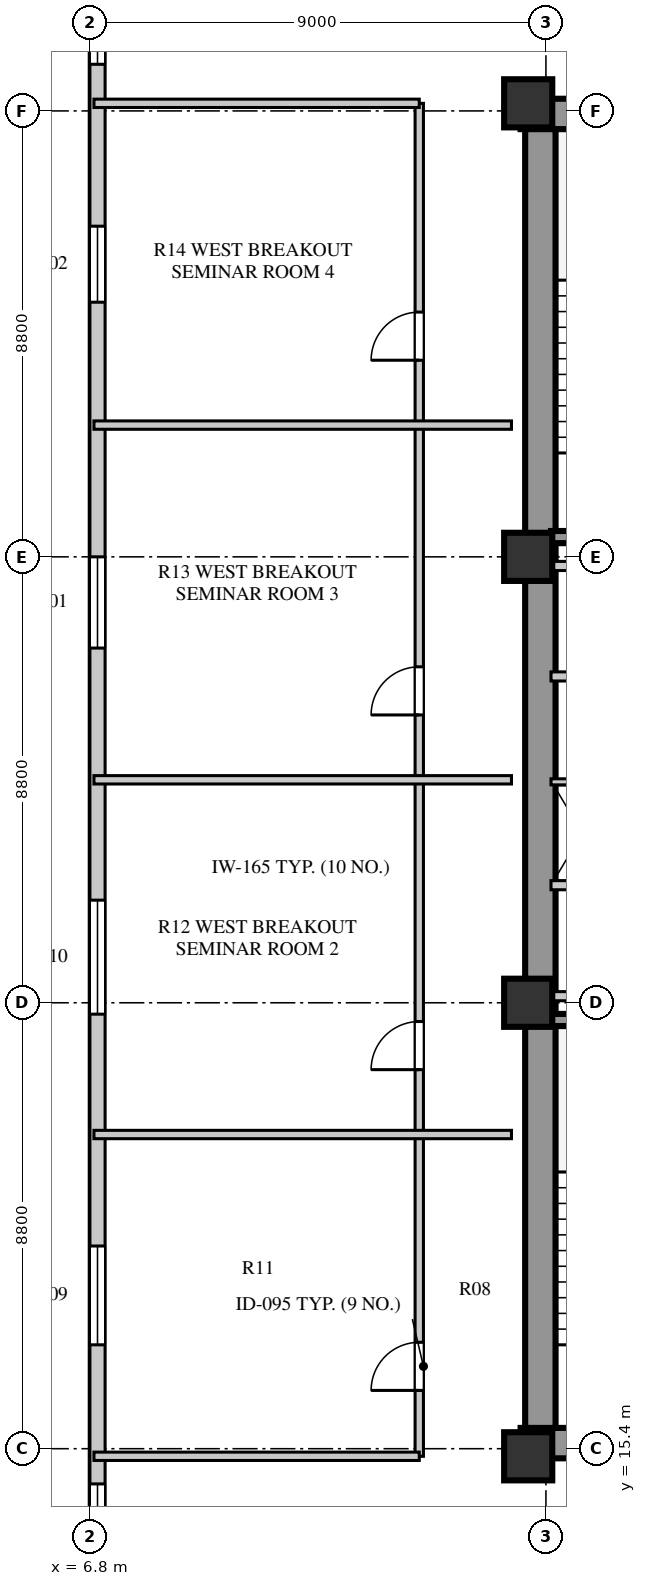
"""IFC4 building model, lengths in metres.
Left out: names, types, materials, properties, quantities, classifications, styles, units other than length and angle.
Written with IfcOpenShell. Run it as: python <this file> out.ifc"""

import sys

from ifc_helpers import new_model, si_unit, direction, frame, frame_2d, origin, origin_2d, place, context, subcontext, project, spatial, rectangle, extrude, element, fill, save


model = new_model("IFC4")
c1 = context("Model", 3, precision=1e-05, world=origin(), true_north=direction((0.0, 1.0)))
c2 = subcontext(c1, "Body", "Model", "MODEL_VIEW")
j1 = project(units=[si_unit("LENGTHUNIT", "METRE"), si_unit("PLANEANGLEUNIT", "RADIAN")], contexts=[c1])
p1 = place(None, origin())
s1 = spatial("IfcSite", under=j1, at=p1, CompositionType="ELEMENT")
p2 = place(p1, origin())
s2 = spatial("IfcBuilding", under=s1, at=p2, CompositionType="ELEMENT")
p3 = place(p2, frame((0.0, 0.0, 21.5)))
s3 = spatial("IfcBuildingStorey", under=s2, at=p3, CompositionType="ELEMENT", Elevation=21.5)
for number, where, z_axis, x_axis in (
    (1, (15.3, 15.51, 0.0), (0.0, 0.0, 1.0), (1.0, 0.0, 0.0)),
    (2, (15.3, 41.74, 0.0), (0.0, 0.0, 1.0), (1.0, 0.0, 0.0)),
):
    element("IfcWall", number, at=place(p3, frame(where, z_axis=z_axis, x_axis=x_axis)), inside=s3, PredefinedType="SHEAR", context=c2, shape_type="SweptSolid", body=[
        extrude(rectangle(XDim=9.88, YDim=0.6, at=frame_2d((4.94, 0.0))), origin(), (0.0, 0.0, 1.0), 4.22),
    ])
p4 = place(p3, frame((15.69, 15.81, 0.0), z_axis=(0.0, 0.0, 1.0), x_axis=(0.0, 1.0, 0.0)))
e3 = element("IfcWall", 3, at=p4, inside=s3, PredefinedType="SHEAR", context=c2, shape_type="SweptSolid", body=[
    extrude(rectangle(XDim=25.63, YDim=0.6, at=frame_2d((12.815, 0.0))), origin(), (0.0, 0.0, 1.0), 4.22),
])
for number, where, z_axis, x_axis in (
    (4, (15.45, 15.25, 0.0), (0.0, 0.0, 1.0), (1.0, 0.0, 0.0)),
    (5, (15.45, 24.2, 0.0), (0.0, 0.0, 1.0), (1.0, 0.0, 0.0)),
    (6, (15.45, 33.0, 0.0), (0.0, 0.0, 1.0), (1.0, 0.0, 0.0)),
    (7, (15.45, 41.95, 0.0), (0.0, 0.0, 1.0), (1.0, 0.0, 0.0)),
):
    element("IfcColumn", number, at=place(p3, frame(where, z_axis=z_axis, x_axis=x_axis)), inside=s3, PredefinedType="COLUMN", context=c2, shape_type="SweptSolid", body=[
        extrude(rectangle(XDim=0.95, YDim=0.95, at=origin_2d()), origin(), (0.0, 0.0, 1.0), 4.22),
    ])
p5 = place(p3, frame((6.95, 44.8, 0.0), z_axis=(0.0, 0.0, 1.0), x_axis=(0.0, -1.0, 0.0)))
e8 = element("IfcWall", 8, at=p5, inside=s3, PredefinedType="STANDARD", context=c2, shape_type="SweptSolid", body=[
    extrude(rectangle(XDim=32.4, YDim=0.3, at=frame_2d((16.2, 0.0))), origin(), (0.0, 0.0, 1.0), 4.22),
])
p6 = place(p5, frame((30.095, 0.0, 0.8)))
e9 = element("IfcOpeningElement", 9, at=p6, cuts=e8, PredefinedType="OPENING", context=c2, shape_type="SweptSolid", body=[
    extrude(rectangle(XDim=1.65, YDim=1.95, at=frame_2d((0.825, 0.975))), frame((0.0, 0.16, 0.0), z_axis=(0.0, -1.0, 0.0), x_axis=(1.0, 0.0, 0.0)), (0.0, 0.0, 1.0), 0.32),
])
p7 = place(p5, frame((25.4, 0.0, 0.8)))
e10 = element("IfcOpeningElement", 10, at=p7, cuts=e8, PredefinedType="OPENING", context=c2, shape_type="SweptSolid", body=[
    extrude(rectangle(XDim=1.95, YDim=2.0, at=frame_2d((0.975, 1.0))), frame((0.0, 0.16, 0.0), z_axis=(0.0, -1.0, 0.0), x_axis=(1.0, 0.0, 0.0)), (0.0, 0.0, 1.0), 0.32),
])
p8 = place(p5, frame((18.575, 0.0, 0.8)))
e11 = element("IfcOpeningElement", 11, at=p8, cuts=e8, PredefinedType="OPENING", context=c2, shape_type="SweptSolid", body=[
    extrude(rectangle(XDim=2.25, YDim=2.0, at=frame_2d((1.125, 1.0))), frame((0.0, 0.16, 0.0), z_axis=(0.0, -1.0, 0.0), x_axis=(1.0, 0.0, 0.0)), (0.0, 0.0, 1.0), 0.32),
])
p9 = place(p5, frame((11.8, 0.0, 0.8)))
e12 = element("IfcOpeningElement", 12, at=p9, cuts=e8, PredefinedType="OPENING", context=c2, shape_type="SweptSolid", body=[
    extrude(rectangle(XDim=1.8, YDim=2.0, at=frame_2d((0.9, 1.0))), frame((0.0, 0.16, 0.0), z_axis=(0.0, -1.0, 0.0), x_axis=(1.0, 0.0, 0.0)), (0.0, 0.0, 1.0), 0.32),
])
p10 = place(p5, frame((5.275, 0.0, 0.8)))
e13 = element("IfcOpeningElement", 13, at=p10, cuts=e8, PredefinedType="OPENING", context=c2, shape_type="SweptSolid", body=[
    extrude(rectangle(XDim=1.5, YDim=2.0, at=frame_2d((0.75, 1.0))), frame((0.0, 0.16, 0.0), z_axis=(0.0, -1.0, 0.0), x_axis=(1.0, 0.0, 0.0)), (0.0, 0.0, 1.0), 0.32),
])
p11 = place(p5, frame((0.88, 0.0, 0.8)))
e14 = element("IfcOpeningElement", 14, at=p11, cuts=e8, PredefinedType="OPENING", context=c2, shape_type="SweptSolid", body=[
    extrude(rectangle(XDim=1.2, YDim=1.75, at=frame_2d((0.6, 0.875))), frame((0.0, 0.16, 0.0), z_axis=(0.0, -1.0, 0.0), x_axis=(1.0, 0.0, 0.0)), (0.0, 0.0, 1.0), 0.32),
])
p12 = place(p3, frame((15.9, 23.86, 0.0), z_axis=(0.0, 0.0, 1.0), x_axis=(1.0, 0.0, 0.0)))
e15 = element("IfcWall", 15, at=p12, inside=s3, PredefinedType="SHEAR", context=c2, shape_type="SweptSolid", body=[
    extrude(rectangle(XDim=3.52, YDim=0.24, at=frame_2d((1.76, 0.0))), origin(), (0.0, 0.0, 1.0), 4.5),
])
p13 = place(p3, frame((15.9, 26.52, 0.0), z_axis=(0.0, 0.0, 1.0), x_axis=(1.0, 0.0, 0.0)))
e16 = element("IfcWall", 16, at=p13, inside=s3, PredefinedType="SOLIDWALL", context=c2, shape_type="SweptSolid", body=[
    extrude(rectangle(XDim=8.68, YDim=0.18, at=frame_2d((4.34, 0.0))), origin(), (0.0, 0.0, 1.0), 4.22),
])
p14 = place(p13, frame((1.76, 0.0, 0.0)))
e17 = element("IfcOpeningElement", 17, at=p14, cuts=e16, PredefinedType="OPENING", context=c2, shape_type="SweptSolid", body=[
    extrude(rectangle(XDim=1.0, YDim=2.1, at=frame_2d((0.5, 1.05))), frame((0.0, 0.1, 0.0), z_axis=(0.0, -1.0, 0.0), x_axis=(1.0, 0.0, 0.0)), (0.0, 0.0, 1.0), 0.2),
])
p15 = place(p13, frame((3.6, 0.0, 0.0)))
e18 = element("IfcOpeningElement", 18, at=p15, cuts=e16, PredefinedType="OPENING", context=c2, shape_type="SweptSolid", body=[
    extrude(rectangle(XDim=1.0, YDim=2.1, at=frame_2d((0.5, 1.05))), frame((0.0, 0.1, 0.0), z_axis=(0.0, -1.0, 0.0), x_axis=(1.0, 0.0, 0.0)), (0.0, 0.0, 1.0), 0.2),
])
p16 = place(p13, frame((5.44, 0.0, 0.0)))
e19 = element("IfcOpeningElement", 19, at=p16, cuts=e16, PredefinedType="OPENING", context=c2, shape_type="SweptSolid", body=[
    extrude(rectangle(XDim=1.0, YDim=2.1, at=frame_2d((0.5, 1.05))), frame((0.0, 0.1, 0.0), z_axis=(0.0, -1.0, 0.0), x_axis=(1.0, 0.0, 0.0)), (0.0, 0.0, 1.0), 0.2),
])
p17 = place(p13, frame((7.28, 0.0, 0.0)))
e20 = element("IfcOpeningElement", 20, at=p17, cuts=e16, PredefinedType="OPENING", context=c2, shape_type="SweptSolid", body=[
    extrude(rectangle(XDim=1.0, YDim=2.1, at=frame_2d((0.5, 1.05))), frame((0.0, 0.1, 0.0), z_axis=(0.0, -1.0, 0.0), x_axis=(1.0, 0.0, 0.0)), (0.0, 0.0, 1.0), 0.2),
])
p18 = place(p3, frame((15.9, 24.33, 0.0), z_axis=(0.0, 0.0, 1.0), x_axis=(1.0, 0.0, 0.0)))
e21 = element("IfcWall", 21, at=p18, inside=s3, PredefinedType="SOLIDWALL", context=c2, shape_type="SweptSolid", body=[
    extrude(rectangle(XDim=8.68, YDim=0.18, at=frame_2d((4.34, 0.0))), origin(), (0.0, 0.0, 1.0), 3.42),
])
p19 = place(p3, frame((15.9, 28.56, 0.0), z_axis=(0.0, 0.0, 1.0), x_axis=(1.0, 0.0, 0.0)))
e22 = element("IfcWall", 22, at=p19, inside=s3, PredefinedType="PARTITIONING", context=c2, shape_type="SweptSolid", body=[
    extrude(rectangle(XDim=1.2, YDim=0.12, at=frame_2d((0.6, 0.0))), origin(), (0.0, 0.0, 1.0), 4.22),
])
p20 = place(p3, frame((15.9, 30.64, 0.0), z_axis=(0.0, 0.0, 1.0), x_axis=(1.0, 0.0, 0.0)))
e23 = element("IfcWall", 23, at=p20, inside=s3, PredefinedType="SOLIDWALL", context=c2, shape_type="SweptSolid", body=[
    extrude(rectangle(XDim=8.68, YDim=0.18, at=frame_2d((4.34, 0.0))), origin(), (0.0, 0.0, 1.0), 4.22),
])
p21 = place(p20, frame((1.76, 0.0, 0.0)))
e24 = element("IfcOpeningElement", 24, at=p21, cuts=e23, PredefinedType="OPENING", context=c2, shape_type="SweptSolid", body=[
    extrude(rectangle(XDim=1.0, YDim=2.1, at=frame_2d((0.5, 1.05))), frame((0.0, 0.1, 0.0), z_axis=(0.0, -1.0, 0.0), x_axis=(1.0, 0.0, 0.0)), (0.0, 0.0, 1.0), 0.2),
])
p22 = place(p20, frame((3.6, 0.0, 0.0)))
e25 = element("IfcOpeningElement", 25, at=p22, cuts=e23, PredefinedType="OPENING", context=c2, shape_type="SweptSolid", body=[
    extrude(rectangle(XDim=1.0, YDim=2.1, at=frame_2d((0.5, 1.05))), frame((0.0, 0.1, 0.0), z_axis=(0.0, -1.0, 0.0), x_axis=(1.0, 0.0, 0.0)), (0.0, 0.0, 1.0), 0.2),
])
p23 = place(p20, frame((5.44, 0.0, 0.0)))
e26 = element("IfcOpeningElement", 26, at=p23, cuts=e23, PredefinedType="OPENING", context=c2, shape_type="SweptSolid", body=[
    extrude(rectangle(XDim=1.0, YDim=2.1, at=frame_2d((0.5, 1.05))), frame((0.0, 0.1, 0.0), z_axis=(0.0, -1.0, 0.0), x_axis=(1.0, 0.0, 0.0)), (0.0, 0.0, 1.0), 0.2),
])
p24 = place(p20, frame((7.28, 0.0, 0.0)))
e27 = element("IfcOpeningElement", 27, at=p24, cuts=e23, PredefinedType="OPENING", context=c2, shape_type="SweptSolid", body=[
    extrude(rectangle(XDim=1.0, YDim=2.1, at=frame_2d((0.5, 1.05))), frame((0.0, 0.1, 0.0), z_axis=(0.0, -1.0, 0.0), x_axis=(1.0, 0.0, 0.0)), (0.0, 0.0, 1.0), 0.2),
])
p25 = place(p3, frame((15.9, 32.82, 0.0), z_axis=(0.0, 0.0, 1.0), x_axis=(1.0, 0.0, 0.0)))
e28 = element("IfcWall", 28, at=p25, inside=s3, PredefinedType="SOLIDWALL", context=c2, shape_type="SweptSolid", body=[
    extrude(rectangle(XDim=8.68, YDim=0.18, at=frame_2d((4.34, 0.0))), origin(), (0.0, 0.0, 1.0), 3.42),
])
p26 = place(p3, frame((15.9, 33.39, 0.0), z_axis=(0.0, 0.0, 1.0), x_axis=(1.0, 0.0, 0.0)))
e29 = element("IfcWall", 29, at=p26, inside=s3, PredefinedType="SHEAR", context=c2, shape_type="SweptSolid", body=[
    extrude(rectangle(XDim=3.52, YDim=0.24, at=frame_2d((1.76, 0.0))), origin(), (0.0, 0.0, 1.0), 4.5),
])
p27 = place(p3, frame((13.3, 15.25, 0.0), z_axis=(0.0, 0.0, 1.0), x_axis=(0.0, 1.0, 0.0)))
e30 = element("IfcWall", 30, at=p27, inside=s3, PredefinedType="PARTITIONING", context=c2, shape_type="SweptSolid", body=[
    extrude(rectangle(XDim=26.7, YDim=0.165, at=frame_2d((13.35, 0.0))), origin(), (0.0, 0.0, 1.0), 4.22),
])
p28 = place(p27, frame((1.3, 0.0, 0.0)))
e31 = element("IfcOpeningElement", 31, at=p28, cuts=e30, PredefinedType="OPENING", context=c2, shape_type="SweptSolid", body=[
    extrude(rectangle(XDim=0.95, YDim=2.08, at=frame_2d((0.475, 1.04))), frame((0.0, 0.093, 0.0), z_axis=(0.0, -1.0, 0.0), x_axis=(1.0, 0.0, 0.0)), (0.0, 0.0, 1.0), 0.185),
])
p29 = place(p27, frame((7.63, 0.0, 0.0)))
e32 = element("IfcOpeningElement", 32, at=p29, cuts=e30, PredefinedType="OPENING", context=c2, shape_type="SweptSolid", body=[
    extrude(rectangle(XDim=0.95, YDim=2.08, at=frame_2d((0.475, 1.04))), frame((0.0, 0.093, 0.0), z_axis=(0.0, -1.0, 0.0), x_axis=(1.0, 0.0, 0.0)), (0.0, 0.0, 1.0), 0.185),
])
p30 = place(p27, frame((14.63, 0.0, 0.0)))
e33 = element("IfcOpeningElement", 33, at=p30, cuts=e30, PredefinedType="OPENING", context=c2, shape_type="SweptSolid", body=[
    extrude(rectangle(XDim=0.95, YDim=2.08, at=frame_2d((0.475, 1.04))), frame((0.0, 0.093, 0.0), z_axis=(0.0, -1.0, 0.0), x_axis=(1.0, 0.0, 0.0)), (0.0, 0.0, 1.0), 0.185),
])
p31 = place(p27, frame((21.63, 0.0, 0.0)))
e34 = element("IfcOpeningElement", 34, at=p31, cuts=e30, PredefinedType="OPENING", context=c2, shape_type="SweptSolid", body=[
    extrude(rectangle(XDim=0.95, YDim=2.08, at=frame_2d((0.475, 1.04))), frame((0.0, 0.093, 0.0), z_axis=(0.0, -1.0, 0.0), x_axis=(1.0, 0.0, 0.0)), (0.0, 0.0, 1.0), 0.185),
])
for number, where, z_axis, x_axis in (
    (35, (6.88, 15.25, 0.0), (0.0, 0.0, 1.0), (1.0, 0.0, 0.0)),
    (36, (6.88, 41.95, 0.0), (0.0, 0.0, 1.0), (1.0, 0.0, 0.0)),
):
    element("IfcWall", number, at=place(p3, frame(where, z_axis=z_axis, x_axis=x_axis)), inside=s3, PredefinedType="PARTITIONING", context=c2, shape_type="SweptSolid", body=[
        extrude(rectangle(XDim=6.42, YDim=0.165, at=frame_2d((3.21, 0.0))), origin(), (0.0, 0.0, 1.0), 3.72),
    ])
for number, where, z_axis, x_axis in (
    (37, (6.88, 21.6, 0.0), (0.0, 0.0, 1.0), (1.0, 0.0, 0.0)),
    (38, (6.88, 28.6, 0.0), (0.0, 0.0, 1.0), (1.0, 0.0, 0.0)),
    (39, (6.88, 35.6, 0.0), (0.0, 0.0, 1.0), (1.0, 0.0, 0.0)),
):
    element("IfcWall", number, at=place(p3, frame(where, z_axis=z_axis, x_axis=x_axis)), inside=s3, PredefinedType="PARTITIONING", context=c2, shape_type="SweptSolid", body=[
        extrude(rectangle(XDim=8.24, YDim=0.165, at=frame_2d((4.12, 0.0))), origin(), (0.0, 0.0, 1.0), 4.22),
    ])
p32 = place(p6, origin())
e40 = element("IfcWindow", 40, at=p32, inside=s3, PartitioningType="SINGLE_PANEL", PredefinedType="WINDOW", context=c2, shape_type="SweptSolid", body=[
    extrude(rectangle(XDim=1.65, YDim=1.95, at=frame_2d((0.825, 0.975))), frame((0.0, 0.03, 0.0), z_axis=(0.0, -1.0, 0.0), x_axis=(1.0, 0.0, 0.0)), (0.0, 0.0, 1.0), 0.06),
])
fill(e9, e40)
p33 = place(p7, origin())
e41 = element("IfcWindow", 41, at=p33, inside=s3, PartitioningType="SINGLE_PANEL", PredefinedType="WINDOW", context=c2, shape_type="SweptSolid", body=[
    extrude(rectangle(XDim=1.95, YDim=2.0, at=frame_2d((0.975, 1.0))), frame((0.0, 0.03, 0.0), z_axis=(0.0, -1.0, 0.0), x_axis=(1.0, 0.0, 0.0)), (0.0, 0.0, 1.0), 0.06),
])
fill(e10, e41)
p34 = place(p8, origin())
e42 = element("IfcWindow", 42, at=p34, inside=s3, PartitioningType="SINGLE_PANEL", PredefinedType="WINDOW", context=c2, shape_type="SweptSolid", body=[
    extrude(rectangle(XDim=2.25, YDim=2.0, at=frame_2d((1.125, 1.0))), frame((0.0, 0.03, 0.0), z_axis=(0.0, -1.0, 0.0), x_axis=(1.0, 0.0, 0.0)), (0.0, 0.0, 1.0), 0.06),
])
fill(e11, e42)
p35 = place(p9, origin())
e43 = element("IfcWindow", 43, at=p35, inside=s3, PartitioningType="SINGLE_PANEL", PredefinedType="WINDOW", context=c2, shape_type="SweptSolid", body=[
    extrude(rectangle(XDim=1.8, YDim=2.0, at=frame_2d((0.9, 1.0))), frame((0.0, 0.03, 0.0), z_axis=(0.0, -1.0, 0.0), x_axis=(1.0, 0.0, 0.0)), (0.0, 0.0, 1.0), 0.06),
])
fill(e12, e43)
p36 = place(p10, origin())
e44 = element("IfcWindow", 44, at=p36, inside=s3, PartitioningType="SINGLE_PANEL", PredefinedType="WINDOW", context=c2, shape_type="SweptSolid", body=[
    extrude(rectangle(XDim=1.5, YDim=2.0, at=frame_2d((0.75, 1.0))), frame((0.0, 0.03, 0.0), z_axis=(0.0, -1.0, 0.0), x_axis=(1.0, 0.0, 0.0)), (0.0, 0.0, 1.0), 0.06),
])
fill(e13, e44)
p37 = place(p11, origin())
e45 = element("IfcWindow", 45, at=p37, inside=s3, PartitioningType="SINGLE_PANEL", PredefinedType="WINDOW", context=c2, shape_type="SweptSolid", body=[
    extrude(rectangle(XDim=1.2, YDim=1.75, at=frame_2d((0.6, 0.875))), frame((0.0, 0.03, 0.0), z_axis=(0.0, -1.0, 0.0), x_axis=(1.0, 0.0, 0.0)), (0.0, 0.0, 1.0), 0.06),
])
fill(e14, e45)
p38 = place(p28, origin())
e46 = element("IfcDoor", 46, at=p38, inside=s3, OperationType="SINGLE_SWING_LEFT", PredefinedType="DOOR", context=c2, shape_type="SweptSolid", body=[
    extrude(rectangle(XDim=0.95, YDim=2.08, at=frame_2d((0.475, 1.04))), frame((0.0, 0.025, 0.0), z_axis=(0.0, -1.0, 0.0), x_axis=(1.0, 0.0, 0.0)), (0.0, 0.0, 1.0), 0.05),
])
fill(e31, e46)
p39 = place(p29, origin())
e47 = element("IfcDoor", 47, at=p39, inside=s3, OperationType="SINGLE_SWING_LEFT", PredefinedType="DOOR", context=c2, shape_type="SweptSolid", body=[
    extrude(rectangle(XDim=0.95, YDim=2.08, at=frame_2d((0.475, 1.04))), frame((0.0, 0.025, 0.0), z_axis=(0.0, -1.0, 0.0), x_axis=(1.0, 0.0, 0.0)), (0.0, 0.0, 1.0), 0.05),
])
fill(e32, e47)
p40 = place(p30, origin())
e48 = element("IfcDoor", 48, at=p40, inside=s3, OperationType="SINGLE_SWING_LEFT", PredefinedType="DOOR", context=c2, shape_type="SweptSolid", body=[
    extrude(rectangle(XDim=0.95, YDim=2.08, at=frame_2d((0.475, 1.04))), frame((0.0, 0.025, 0.0), z_axis=(0.0, -1.0, 0.0), x_axis=(1.0, 0.0, 0.0)), (0.0, 0.0, 1.0), 0.05),
])
fill(e33, e48)
p41 = place(p31, origin())
e49 = element("IfcDoor", 49, at=p41, inside=s3, OperationType="SINGLE_SWING_LEFT", PredefinedType="DOOR", context=c2, shape_type="SweptSolid", body=[
    extrude(rectangle(XDim=0.95, YDim=2.08, at=frame_2d((0.475, 1.04))), frame((0.0, 0.025, 0.0), z_axis=(0.0, -1.0, 0.0), x_axis=(1.0, 0.0, 0.0)), (0.0, 0.0, 1.0), 0.05),
])
fill(e34, e49)
save(model, sys.argv[1])
